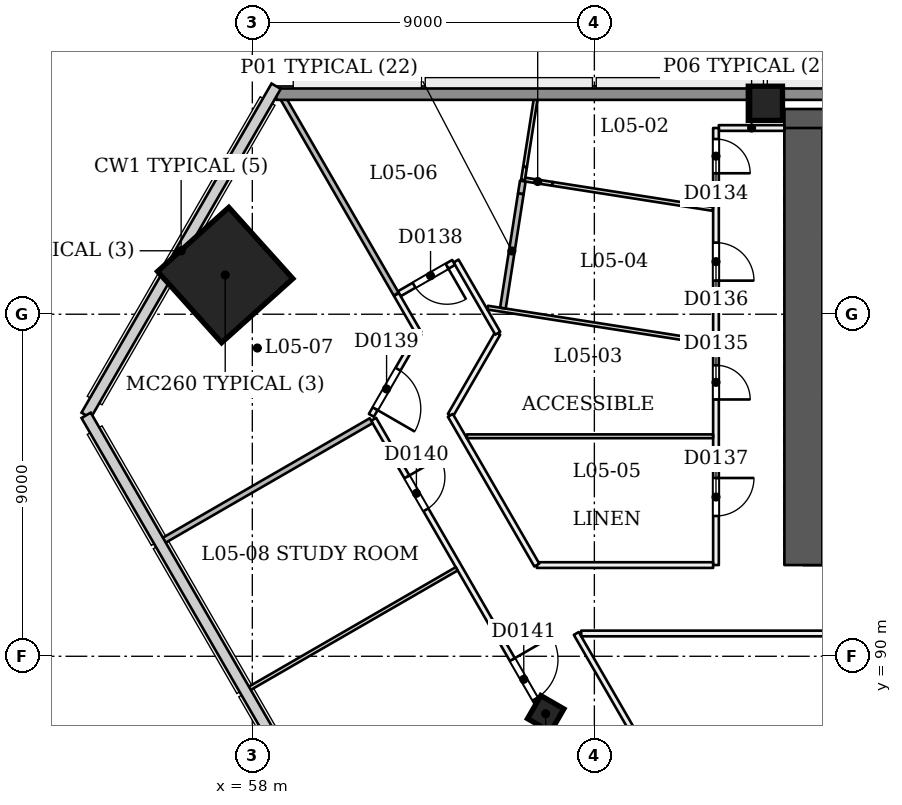
"""IFC4 building model, lengths in metres.
Left out: names, types, materials, properties, quantities, classifications, styles, units other than length and angle.
Written with IfcOpenShell. Run it as: python <this file> out.ifc"""

import sys

from ifc_helpers import new_model, si_unit, direction, frame, frame_2d, origin, origin_2d, place, context, subcontext, project, spatial, rectangle, extrude, element, fill, save


model = new_model("IFC4")
c1 = context("Model", 3, precision=1e-05, world=origin(), true_north=direction((0.0, 1.0)))
c2 = subcontext(c1, "Body", "Model", "MODEL_VIEW")
j1 = project(units=[si_unit("LENGTHUNIT", "METRE"), si_unit("PLANEANGLEUNIT", "RADIAN")], contexts=[c1])
p1 = place(None, origin())
s1 = spatial("IfcSite", under=j1, at=p1, CompositionType="ELEMENT")
p2 = place(p1, origin())
s2 = spatial("IfcBuilding", under=s1, at=p2, CompositionType="ELEMENT")
p3 = place(p2, frame((0.0, 0.0, 27.0)))
s3 = spatial("IfcBuildingStorey", under=s2, at=p3, CompositionType="ELEMENT", Elevation=27.0)
p4 = place(p3, frame((72.5, 92.9, 0.0), z_axis=(0.0, 0.0, 1.0), x_axis=(1.0, 0.0, 0.0)))
e1 = element("IfcWall", 1, at=p4, inside=s3, PredefinedType="SHEAR", context=c2, shape_type="SweptSolid", body=[
    extrude(rectangle(XDim=25.5, YDim=1.0, at=frame_2d((12.75, 0.0))), origin(), (0.0, 0.0, 1.0), 3.6),
])
p5 = place(p4, frame((1.3, 0.0, 0.0)))
e2 = element("IfcOpeningElement", 2, at=p5, cuts=e1, PredefinedType="OPENING", context=c2, shape_type="SweptSolid", body=[
    extrude(rectangle(XDim=1.2, YDim=2.1, at=frame_2d((0.6, 1.05))), frame((0.0, 0.51, 0.0), z_axis=(0.0, -1.0, 0.0), x_axis=(1.0, 0.0, 0.0)), (0.0, 0.0, 1.0), 1.021),
])
p6 = place(p4, frame((3.5, 0.0, 0.0)))
e3 = element("IfcOpeningElement", 3, at=p6, cuts=e1, PredefinedType="OPENING", context=c2, shape_type="SweptSolid", body=[
    extrude(rectangle(XDim=1.2, YDim=2.1, at=frame_2d((0.6, 1.05))), frame((0.0, 0.51, 0.0), z_axis=(0.0, -1.0, 0.0), x_axis=(1.0, 0.0, 0.0)), (0.0, 0.0, 1.0), 1.021),
])
p7 = place(p4, frame((13.5, 0.0, 0.0)))
e4 = element("IfcOpeningElement", 4, at=p7, cuts=e1, PredefinedType="OPENING", context=c2, shape_type="SweptSolid", body=[
    extrude(rectangle(XDim=1.2, YDim=2.1, at=frame_2d((0.6, 1.05))), frame((0.0, 0.51, 0.0), z_axis=(0.0, -1.0, 0.0), x_axis=(1.0, 0.0, 0.0)), (0.0, 0.0, 1.0), 1.021),
])
p8 = place(p4, frame((15.562, 0.0, 0.0)))
e5 = element("IfcOpeningElement", 5, at=p8, cuts=e1, PredefinedType="OPENING", context=c2, shape_type="SweptSolid", body=[
    extrude(rectangle(XDim=1.0, YDim=2.1, at=frame_2d((0.5, 1.05))), frame((0.0, 0.51, 0.0), z_axis=(0.0, -1.0, 0.0), x_axis=(1.0, 0.0, 0.0)), (0.0, 0.0, 1.0), 1.021),
])
p9 = place(p4, frame((17.8, 0.0, 0.0)))
e6 = element("IfcOpeningElement", 6, at=p9, cuts=e1, PredefinedType="OPENING", context=c2, shape_type="SweptSolid", body=[
    extrude(rectangle(XDim=1.0, YDim=2.1, at=frame_2d((0.5, 1.05))), frame((0.0, 0.51, 0.0), z_axis=(0.0, -1.0, 0.0), x_axis=(1.0, 0.0, 0.0)), (0.0, 0.0, 1.0), 1.021),
])
p10 = place(p4, frame((20.35, 0.0, 0.0)))
e7 = element("IfcOpeningElement", 7, at=p10, cuts=e1, PredefinedType="OPENING", context=c2, shape_type="SweptSolid", body=[
    extrude(rectangle(XDim=1.0, YDim=2.1, at=frame_2d((0.5, 1.05))), frame((0.0, 0.51, 0.0), z_axis=(0.0, -1.0, 0.0), x_axis=(1.0, 0.0, 0.0)), (0.0, 0.0, 1.0), 1.021),
])
p11 = place(p4, frame((22.837, 0.0, 0.0)))
e8 = element("IfcOpeningElement", 8, at=p11, cuts=e1, PredefinedType="OPENING", context=c2, shape_type="SweptSolid", body=[
    extrude(rectangle(XDim=1.0, YDim=2.1, at=frame_2d((0.5, 1.05))), frame((0.0, 0.51, 0.0), z_axis=(0.0, -1.0, 0.0), x_axis=(1.0, 0.0, 0.0)), (0.0, 0.0, 1.0), 1.021),
])
p12 = place(p3, frame((97.5, 103.9, 0.0), z_axis=(0.0, 0.0, 1.0), x_axis=(-1.0, 0.0, 0.0)))
e9 = element("IfcWall", 9, at=p12, inside=s3, PredefinedType="SHEAR", context=c2, shape_type="SweptSolid", body=[
    extrude(rectangle(XDim=25.5, YDim=1.0, at=frame_2d((12.75, 0.0))), origin(), (0.0, 0.0, 1.0), 3.6),
])
p13 = place(p3, frame((72.5, 103.9, 0.0), z_axis=(0.0, 0.0, 1.0), x_axis=(0.0, -1.0, 0.0)))
e10 = element("IfcWall", 10, at=p13, inside=s3, PredefinedType="SHEAR", context=c2, shape_type="SweptSolid", body=[
    extrude(rectangle(XDim=11.5, YDim=1.0, at=frame_2d((5.75, 0.0))), origin(), (0.0, 0.0, 1.0), 3.6),
])
p14 = place(p3, frame((65.692, 88.44, -0.021), z_axis=(0.02222134892, 0.038480872521, 0.999012229206), x_axis=(-0.865642072591, -0.499182214127, 0.038482713782)))
e11 = element("IfcColumn", 11, at=p14, inside=s3, PredefinedType="COLUMN", context=c2, shape_type="SweptSolid", body=[
    extrude(rectangle(XDim=0.7, YDim=0.7, at=origin_2d()), origin(), (0.0, 0.0, 1.0), 3.604),
])
p15 = place(p3, frame((57.253, 100.02, 0.0), z_axis=(0.028401796786, 0.009286506348, 0.999553449666), x_axis=(-0.866201915964, 0.499294786535, 0.019973905943)))
e12 = element("IfcColumn", 12, at=p15, inside=s3, PredefinedType="COLUMN", context=c2, shape_type="SweptSolid", body=[
    extrude(rectangle(XDim=2.52, YDim=2.52, at=origin_2d()), origin(), (0.0, 0.0, 1.0), 3.602),
])
p16 = place(p3, frame((71.5, 104.55, 0.0), z_axis=(0.0, 0.0, 1.0), x_axis=(1.0, 0.0, 0.0)))
e13 = element("IfcColumn", 13, at=p16, inside=s3, PredefinedType="COLUMN", context=c2, shape_type="SweptSolid", body=[
    extrude(rectangle(XDim=0.9, YDim=0.9, at=origin_2d()), origin(), (0.0, 0.0, 1.0), 3.6),
])
p17 = place(p3, frame((72.0, 103.9, 0.0), z_axis=(0.0, 0.0, 1.0), x_axis=(-1.0, 0.0, 0.0)))
e14 = element("IfcWall", 14, at=p17, inside=s3, PredefinedType="PARTITIONING", context=c2, shape_type="SweptSolid", body=[
    extrude(rectangle(XDim=1.725, YDim=0.15, at=frame_2d((0.863, 0.0))), origin(), (0.0, 0.0, 1.0), 2.6),
])
p18 = place(p3, frame((63.211, 96.34, 0.0), z_axis=(0.0, 0.0, 1.0), x_axis=(0.50004439687, 0.865999769722, 0.0)))
e15 = element("IfcWall", 15, at=p18, inside=s3, PredefinedType="PARTITIONING", context=c2, shape_type="SweptSolid", body=[
    extrude(rectangle(XDim=2.494, YDim=0.15, at=frame_2d((1.247, 0.0))), origin(), (0.0, 0.0, 1.0), 3.1),
])
p19 = place(p3, frame((70.2, 103.9, 0.0), z_axis=(0.0, 0.0, 1.0), x_axis=(0.0, -1.0, 0.0)))
e16 = element("IfcWall", 16, at=p19, inside=s3, PredefinedType="PARTITIONING", context=c2, shape_type="SweptSolid", body=[
    extrude(rectangle(XDim=11.5, YDim=0.15, at=frame_2d((5.75, 0.0))), origin(), (0.0, 0.0, 1.0), 2.6),
])
p20 = place(p19, frame((0.291, 0.0, 0.0)))
e17 = element("IfcOpeningElement", 17, at=p20, cuts=e16, PredefinedType="OPENING", context=c2, shape_type="SweptSolid", body=[
    extrude(rectangle(XDim=0.9, YDim=2.1, at=frame_2d((0.45, 1.05))), frame((0.0, 0.085, 0.0), z_axis=(0.0, -1.0, 0.0), x_axis=(1.0, 0.0, 0.0)), (0.0, 0.0, 1.0), 0.171),
])
p21 = place(p19, frame((6.243, 0.0, 0.0)))
e18 = element("IfcOpeningElement", 18, at=p21, cuts=e16, PredefinedType="OPENING", context=c2, shape_type="SweptSolid", body=[
    extrude(rectangle(XDim=0.9, YDim=2.1, at=frame_2d((0.45, 1.05))), frame((0.0, 0.085, 0.0), z_axis=(0.0, -1.0, 0.0), x_axis=(1.0, 0.0, 0.0)), (0.0, 0.0, 1.0), 0.171),
])
p22 = place(p19, frame((3.016, 0.0, 0.0)))
e19 = element("IfcOpeningElement", 19, at=p22, cuts=e16, PredefinedType="OPENING", context=c2, shape_type="SweptSolid", body=[
    extrude(rectangle(XDim=1.0, YDim=2.1, at=frame_2d((0.5, 1.05))), frame((0.0, 0.085, 0.0), z_axis=(0.0, -1.0, 0.0), x_axis=(1.0, 0.0, 0.0)), (0.0, 0.0, 1.0), 0.171),
])
p23 = place(p19, frame((9.209, 0.0, 0.0)))
e20 = element("IfcOpeningElement", 20, at=p23, cuts=e16, PredefinedType="OPENING", context=c2, shape_type="SweptSolid", body=[
    extrude(rectangle(XDim=1.0, YDim=2.1, at=frame_2d((0.5, 1.05))), frame((0.0, 0.085, 0.0), z_axis=(0.0, -1.0, 0.0), x_axis=(1.0, 0.0, 0.0)), (0.0, 0.0, 1.0), 0.171),
])
p24 = place(p3, frame((70.125, 92.4, 0.0), z_axis=(0.0, 0.0, 1.0), x_axis=(-1.0, 0.0, 0.0)))
e21 = element("IfcWall", 21, at=p24, inside=s3, PredefinedType="PARTITIONING", context=c2, shape_type="SweptSolid", body=[
    extrude(rectangle(XDim=4.639, YDim=0.15, at=frame_2d((2.32, 0.0))), origin(), (0.0, 0.0, 1.0), 3.1),
])
p25 = place(p3, frame((65.486, 92.4, 0.0), z_axis=(0.0, 0.0, 1.0), x_axis=(-0.499988785058, 0.866031878637, 0.0)))
e22 = element("IfcWall", 22, at=p25, inside=s3, PredefinedType="PARTITIONING", context=c2, shape_type="SweptSolid", body=[
    extrude(rectangle(XDim=4.549, YDim=0.15, at=frame_2d((2.275, 0.0))), origin(), (0.0, 0.0, 1.0), 3.1),
])
p26 = place(p3, frame((64.458, 98.5, 0.0), z_axis=(0.0, 0.0, 1.0), x_axis=(-0.500005024956, 0.866022502605, 0.0)))
e23 = element("IfcWall", 23, at=p26, inside=s3, PredefinedType="PARTITIONING", context=c2, shape_type="SweptSolid", body=[
    extrude(rectangle(XDim=2.194, YDim=0.15, at=frame_2d((1.097, 0.0))), origin(), (0.0, 0.0, 1.0), 3.1),
])
p27 = place(p3, frame((63.296, 100.363, 0.0), z_axis=(0.0, 0.0, 1.0), x_axis=(-0.866298776321, -0.499526205664, 0.0)))
e24 = element("IfcWall", 24, at=p27, inside=s3, PredefinedType="PARTITIONING", context=c2, shape_type="SweptSolid", body=[
    extrude(rectangle(XDim=1.651, YDim=0.15, at=frame_2d((0.826, 0.0))), origin(), (0.0, 0.0, 1.0), 3.1),
])
p28 = place(p27, frame((0.2, 0.0, 0.0)))
e25 = element("IfcOpeningElement", 25, at=p28, cuts=e24, PredefinedType="OPENING", context=c2, shape_type="SweptSolid", body=[
    extrude(rectangle(XDim=1.0, YDim=2.1, at=frame_2d((0.5, 1.05))), frame((0.0, 0.085, 0.0), z_axis=(0.0, -1.0, 0.0), x_axis=(1.0, 0.0, 0.0)), (0.0, 0.0, 1.0), 0.171),
])
p29 = place(p3, frame((61.792, 99.517, 0.0), z_axis=(0.0, 0.0, 1.0), x_axis=(0.499872391225, -0.86609906621, 0.0)))
e26 = element("IfcWall", 26, at=p29, inside=s3, PredefinedType="PARTITIONING", context=c2, shape_type="SweptSolid", body=[
    extrude(rectangle(XDim=1.175, YDim=0.15, at=frame_2d((0.587, 0.0))), origin(), (0.0, 0.0, 1.0), 3.1),
])
p30 = place(p3, frame((62.38, 98.5, 0.0), z_axis=(0.0, 0.0, 1.0), x_axis=(-0.499970989427, -0.866042152399, 0.0)))
e27 = element("IfcWall", 27, at=p30, inside=s3, PredefinedType="PARTITIONING", context=c2, shape_type="SweptSolid", body=[
    extrude(rectangle(XDim=2.494, YDim=0.15, at=frame_2d((1.247, 0.0))), origin(), (0.0, 0.0, 1.0), 3.1),
])
p31 = place(p30, frame((1.094, 0.0, 0.0)))
e28 = element("IfcOpeningElement", 28, at=p31, cuts=e27, PredefinedType="OPENING", context=c2, shape_type="SweptSolid", body=[
    extrude(rectangle(XDim=1.2, YDim=2.1, at=frame_2d((0.6, 1.05))), frame((0.0, 0.085, 0.0), z_axis=(0.0, -1.0, 0.0), x_axis=(1.0, 0.0, 0.0)), (0.0, 0.0, 1.0), 0.171),
])
p32 = place(p3, frame((61.193, 96.236, 0.0), z_axis=(0.0, 0.0, 1.0), x_axis=(0.49999953585, -0.866025671762, 0.0)))
e29 = element("IfcWall", 29, at=p32, inside=s3, PredefinedType="PARTITIONING", context=c2, shape_type="SweptSolid", body=[
    extrude(rectangle(XDim=45.0, YDim=0.15, at=frame_2d((22.5, 0.0))), origin(), (0.0, 0.0, 1.0), 2.7),
])
p33 = place(p32, frame((1.75, 0.0, 0.0)))
e30 = element("IfcOpeningElement", 30, at=p33, cuts=e29, PredefinedType="OPENING", context=c2, shape_type="SweptSolid", body=[
    extrude(rectangle(XDim=1.0, YDim=2.1, at=frame_2d((0.5, 1.05))), frame((0.0, 0.085, 0.0), z_axis=(0.0, -1.0, 0.0), x_axis=(1.0, 0.0, 0.0)), (0.0, 0.0, 1.0), 0.171),
])
p34 = place(p32, frame((7.3, 0.0, 0.0)))
e31 = element("IfcOpeningElement", 31, at=p34, cuts=e29, PredefinedType="OPENING", context=c2, shape_type="SweptSolid", body=[
    extrude(rectangle(XDim=1.2, YDim=2.1, at=frame_2d((0.6, 1.05))), frame((0.0, 0.085, 0.0), z_axis=(0.0, -1.0, 0.0), x_axis=(1.0, 0.0, 0.0)), (0.0, 0.0, 1.0), 0.171),
])
p35 = place(p32, frame((14.071, 0.0, 0.0)))
e32 = element("IfcOpeningElement", 32, at=p35, cuts=e29, PredefinedType="OPENING", context=c2, shape_type="SweptSolid", body=[
    extrude(rectangle(XDim=1.1, YDim=2.1, at=frame_2d((0.55, 1.05))), frame((0.0, 0.085, 0.0), z_axis=(0.0, -1.0, 0.0), x_axis=(1.0, 0.0, 0.0)), (0.0, 0.0, 1.0), 0.171),
])
p36 = place(p32, frame((20.78, 0.0, 0.0)))
e33 = element("IfcOpeningElement", 33, at=p36, cuts=e29, PredefinedType="OPENING", context=c2, shape_type="SweptSolid", body=[
    extrude(rectangle(XDim=1.0, YDim=2.1, at=frame_2d((0.5, 1.05))), frame((0.0, 0.085, 0.0), z_axis=(0.0, -1.0, 0.0), x_axis=(1.0, 0.0, 0.0)), (0.0, 0.0, 1.0), 0.171),
])
p37 = place(p32, frame((23.105, 0.0, 0.0)))
e34 = element("IfcOpeningElement", 34, at=p37, cuts=e29, PredefinedType="OPENING", context=c2, shape_type="SweptSolid", body=[
    extrude(rectangle(XDim=1.0, YDim=2.1, at=frame_2d((0.5, 1.05))), frame((0.0, 0.085, 0.0), z_axis=(0.0, -1.0, 0.0), x_axis=(1.0, 0.0, 0.0)), (0.0, 0.0, 1.0), 0.171),
])
p38 = place(p32, frame((28.75, 0.0, 0.0)))
e35 = element("IfcOpeningElement", 35, at=p38, cuts=e29, PredefinedType="OPENING", context=c2, shape_type="SweptSolid", body=[
    extrude(rectangle(XDim=1.0, YDim=2.1, at=frame_2d((0.5, 1.05))), frame((0.0, 0.085, 0.0), z_axis=(0.0, -1.0, 0.0), x_axis=(1.0, 0.0, 0.0)), (0.0, 0.0, 1.0), 0.171),
])
p39 = place(p32, frame((34.3, 0.0, 0.0)))
e36 = element("IfcOpeningElement", 36, at=p39, cuts=e29, PredefinedType="OPENING", context=c2, shape_type="SweptSolid", body=[
    extrude(rectangle(XDim=1.2, YDim=2.1, at=frame_2d((0.6, 1.05))), frame((0.0, 0.085, 0.0), z_axis=(0.0, -1.0, 0.0), x_axis=(1.0, 0.0, 0.0)), (0.0, 0.0, 1.0), 0.171),
])
p40 = place(p32, frame((43.28, 0.0, 0.0)))
e37 = element("IfcOpeningElement", 37, at=p40, cuts=e29, PredefinedType="OPENING", context=c2, shape_type="SweptSolid", body=[
    extrude(rectangle(XDim=1.0, YDim=2.1, at=frame_2d((0.5, 1.05))), frame((0.0, 0.085, 0.0), z_axis=(0.0, -1.0, 0.0), x_axis=(1.0, 0.0, 0.0)), (0.0, 0.0, 1.0), 0.171),
])
p41 = place(p3, frame((84.792, 58.96, 0.0), z_axis=(0.0, 0.0, 1.0), x_axis=(-0.499995675587, 0.866027900471, 0.0)))
e38 = element("IfcWall", 38, at=p41, inside=s3, PredefinedType="PARTITIONING", context=c2, shape_type="SweptSolid", body=[
    extrude(rectangle(XDim=36.534, YDim=0.15, at=frame_2d((18.267, 0.0))), origin(), (0.0, 0.0, 1.0), 3.1),
])
p42 = place(p41, frame((4.466, 0.0, 0.0)))
e39 = element("IfcOpeningElement", 39, at=p42, cuts=e38, PredefinedType="OPENING", context=c2, shape_type="SweptSolid", body=[
    extrude(rectangle(XDim=1.2, YDim=2.1, at=frame_2d((0.6, 1.05))), frame((0.0, 0.085, 0.0), z_axis=(0.0, -1.0, 0.0), x_axis=(1.0, 0.0, 0.0)), (0.0, 0.0, 1.0), 0.171),
])
p43 = place(p41, frame((16.337, 0.0, 0.0)))
e40 = element("IfcOpeningElement", 40, at=p43, cuts=e38, PredefinedType="OPENING", context=c2, shape_type="SweptSolid", body=[
    extrude(rectangle(XDim=1.2, YDim=2.1, at=frame_2d((0.6, 1.05))), frame((0.0, 0.085, 0.0), z_axis=(0.0, -1.0, 0.0), x_axis=(1.0, 0.0, 0.0)), (0.0, 0.0, 1.0), 0.171),
])
p44 = place(p41, frame((30.124, 0.0, 0.0)))
e41 = element("IfcOpeningElement", 41, at=p44, cuts=e38, PredefinedType="OPENING", context=c2, shape_type="SweptSolid", body=[
    extrude(rectangle(XDim=1.2, YDim=2.1, at=frame_2d((0.6, 1.05))), frame((0.0, 0.085, 0.0), z_axis=(0.0, -1.0, 0.0), x_axis=(1.0, 0.0, 0.0)), (0.0, 0.0, 1.0), 0.171),
])
p45 = place(p41, frame((24.546, 0.0, 0.0)))
e42 = element("IfcOpeningElement", 42, at=p45, cuts=e38, PredefinedType="OPENING", context=c2, shape_type="SweptSolid", body=[
    extrude(rectangle(XDim=1.2, YDim=2.1, at=frame_2d((0.6, 1.05))), frame((0.0, 0.085, 0.0), z_axis=(0.0, -1.0, 0.0), x_axis=(1.0, 0.0, 0.0)), (0.0, 0.0, 1.0), 0.171),
])
p46 = place(p3, frame((66.655, 90.6, 0.0), z_axis=(0.0, 0.0, 1.0), x_axis=(0.999999997968, -6.3746036e-05, 0.0)))
e43 = element("IfcWall", 43, at=p46, inside=s3, PredefinedType="PARTITIONING", context=c2, shape_type="SweptSolid", body=[
    extrude(rectangle(XDim=15.32, YDim=0.15, at=frame_2d((7.66, 0.0))), origin(), (0.0, 0.0, 1.0), 3.1),
])
p47 = place(p3, frame((65.125, 102.552, 0.0), z_axis=(0.0, 0.0, 1.0), x_axis=(0.987935551698, -0.154865572969, 0.0)))
e44 = element("IfcWall", 44, at=p47, inside=s3, PredefinedType="PARTITIONING", context=c2, shape_type="SweptSolid", body=[
    extrude(rectangle(XDim=0.777, YDim=0.1, at=frame_2d((0.389, 0.0))), origin(), (0.0, 0.0, 1.0), 2.6),
])
p48 = place(p3, frame((65.893, 102.432, 0.0), z_axis=(0.0, 0.0, 1.0), x_axis=(0.987956178166, -0.154733933008, 0.0)))
e45 = element("IfcWall", 45, at=p48, inside=s3, PredefinedType="PARTITIONING", context=c2, shape_type="SweptSolid", body=[
    extrude(rectangle(XDim=4.276, YDim=0.1, at=frame_2d((2.138, 0.0))), origin(), (0.0, 0.0, 1.0), 3.1),
])
p49 = place(p3, frame((65.493, 104.9, 0.0), z_axis=(0.0, 0.0, 1.0), x_axis=(-0.154751183602, -0.987953476219, 0.0)))
e46 = element("IfcWall", 46, at=p49, inside=s3, PredefinedType="PARTITIONING", context=c2, shape_type="SweptSolid", body=[
    extrude(rectangle(XDim=2.049, YDim=0.1, at=frame_2d((1.025, 0.0))), origin(), (0.0, 0.0, 1.0), 3.1),
])
p50 = place(p3, frame((65.176, 102.875, 0.0), z_axis=(0.0, 0.0, 1.0), x_axis=(-0.154698630223, -0.98796170665, 0.0)))
e47 = element("IfcWall", 47, at=p50, inside=s3, PredefinedType="PARTITIONING", context=c2, shape_type="SweptSolid", body=[
    extrude(rectangle(XDim=0.347, YDim=0.1, at=frame_2d((0.174, 0.0))), origin(), (0.0, 0.0, 1.0), 2.6),
])
p51 = place(p3, frame((70.117, 98.245, 0.0), z_axis=(0.0, 0.0, 1.0), x_axis=(-0.987955306668, 0.154739497307, 0.0)))
e48 = element("IfcWall", 48, at=p51, inside=s3, PredefinedType="PARTITIONING", context=c2, shape_type="SweptSolid", body=[
    extrude(rectangle(XDim=5.997, YDim=0.1, at=frame_2d((2.999, 0.0))), origin(), (0.0, 0.0, 1.0), 3.1),
])
p52 = place(p3, frame((63.645, 95.789, 0.0), z_axis=(0.0, 0.0, 1.0), x_axis=(1.0, 0.0, 0.0)))
e49 = element("IfcWall", 49, at=p52, inside=s3, PredefinedType="PARTITIONING", context=c2, shape_type="SweptSolid", body=[
    extrude(rectangle(XDim=6.48, YDim=0.1, at=frame_2d((3.24, 0.0))), origin(), (0.0, 0.0, 1.0), 3.1),
])
p53 = place(p3, frame((65.117, 102.502, 0.0), z_axis=(0.0, 0.0, 1.0), x_axis=(-0.154553127564, -0.987984479008, 0.0)))
e50 = element("IfcWall", 50, at=p53, inside=s3, PredefinedType="PARTITIONING", context=c2, shape_type="SweptSolid", body=[
    extrude(rectangle(XDim=0.338, YDim=0.15, at=frame_2d((0.169, 0.0))), origin(), (0.0, 0.0, 1.0), 2.6),
])
p54 = place(p3, frame((65.065, 102.168, 0.0), z_axis=(0.0, 0.0, 1.0), x_axis=(-0.154702251665, -0.987961139585, 0.0)))
e51 = element("IfcWall", 51, at=p54, inside=s3, PredefinedType="PARTITIONING", context=c2, shape_type="SweptSolid", body=[
    extrude(rectangle(XDim=3.044, YDim=0.15, at=frame_2d((1.522, 0.0))), origin(), (0.0, 0.0, 1.0), 3.1),
])
p55 = place(p3, frame((58.685, 104.9, 0.0), z_axis=(0.0, 0.0, 1.0), x_axis=(0.500005339912, -0.866022320763, 0.0)))
e52 = element("IfcWall", 52, at=p55, inside=s3, PredefinedType="PARTITIONING", context=c2, shape_type="SweptSolid", body=[
    extrude(rectangle(XDim=6.201, YDim=0.15, at=frame_2d((3.1, 0.0))), origin(), (0.0, 0.0, 1.0), 2.6),
])
p56 = place(p3, frame((55.633, 93.025, 0.0), z_axis=(0.0, 0.0, 1.0), x_axis=(0.866025401434, 0.500000004071, 0.0)))
e53 = element("IfcWall", 53, at=p56, inside=s3, PredefinedType="PARTITIONING", context=c2, shape_type="SweptSolid", body=[
    extrude(rectangle(XDim=6.345, YDim=0.15, at=frame_2d((3.173, 0.0))), origin(), (0.0, 0.0, 1.0), 2.6),
])
p57 = place(p3, frame((57.883, 89.128, 0.0), z_axis=(0.0, 0.0, 1.0), x_axis=(0.866025401434, 0.500000004071, 0.0)))
e54 = element("IfcWall", 54, at=p57, inside=s3, PredefinedType="PARTITIONING", context=c2, shape_type="SweptSolid", body=[
    extrude(rectangle(XDim=6.345, YDim=0.1, at=frame_2d((3.173, 0.0))), origin(), (0.0, 0.0, 1.0), 2.6),
])
p58 = place(p3, frame((58.627, 104.79, 0.0), z_axis=(0.0, 0.0, 1.0), x_axis=(1.0, 0.0, 0.0)))
e55 = element("IfcWall", 55, at=p58, inside=s3, PredefinedType="SOLIDWALL", context=c2, shape_type="SweptSolid", body=[
    extrude(rectangle(XDim=52.746, YDim=0.3, at=frame_2d((26.373, 0.0))), origin(), (0.0, 0.0, 1.0), 2.6),
])
p59 = place(p20, origin())
e56 = element("IfcDoor", 56, at=p59, inside=s3, OperationType="SINGLE_SWING_RIGHT", PredefinedType="NOTDEFINED", context=c2, shape_type="SweptSolid", body=[
    extrude(rectangle(XDim=0.9, YDim=2.1, at=frame_2d((0.45, 1.05))), frame((0.0, 0.025, 0.0), z_axis=(0.0, -1.0, 0.0), x_axis=(1.0, 0.0, 0.0)), (0.0, 0.0, 1.0), 0.05),
])
fill(e17, e56)
p60 = place(p21, origin())
e57 = element("IfcDoor", 57, at=p60, inside=s3, OperationType="SINGLE_SWING_RIGHT", PredefinedType="NOTDEFINED", context=c2, shape_type="SweptSolid", body=[
    extrude(rectangle(XDim=0.9, YDim=2.1, at=frame_2d((0.45, 1.05))), frame((0.0, 0.025, 0.0), z_axis=(0.0, -1.0, 0.0), x_axis=(1.0, 0.0, 0.0)), (0.0, 0.0, 1.0), 0.05),
])
fill(e18, e57)
p61 = place(p22, origin())
e58 = element("IfcDoor", 58, at=p61, inside=s3, OperationType="SINGLE_SWING_RIGHT", PredefinedType="NOTDEFINED", context=c2, shape_type="SweptSolid", body=[
    extrude(rectangle(XDim=1.0, YDim=2.1, at=frame_2d((0.5, 1.05))), frame((0.0, 0.025, 0.0), z_axis=(0.0, -1.0, 0.0), x_axis=(1.0, 0.0, 0.0)), (0.0, 0.0, 1.0), 0.05),
])
fill(e19, e58)
p62 = place(p23, origin())
e59 = element("IfcDoor", 59, at=p62, inside=s3, OperationType="SINGLE_SWING_LEFT", PredefinedType="NOTDEFINED", context=c2, shape_type="SweptSolid", body=[
    extrude(rectangle(XDim=1.0, YDim=2.1, at=frame_2d((0.5, 1.05))), frame((0.0, 0.025, 0.0), z_axis=(0.0, -1.0, 0.0), x_axis=(1.0, 0.0, 0.0)), (0.0, 0.0, 1.0), 0.05),
])
fill(e20, e59)
p63 = place(p28, origin())
e60 = element("IfcDoor", 60, at=p63, inside=s3, OperationType="SINGLE_SWING_LEFT", PredefinedType="NOTDEFINED", context=c2, shape_type="SweptSolid", body=[
    extrude(rectangle(XDim=1.0, YDim=2.1, at=frame_2d((0.5, 1.05))), frame((0.0, 0.025, 0.0), z_axis=(0.0, -1.0, 0.0), x_axis=(1.0, 0.0, 0.0)), (0.0, 0.0, 1.0), 0.05),
])
fill(e25, e60)
p64 = place(p31, origin())
e61 = element("IfcDoor", 61, at=p64, inside=s3, OperationType="SINGLE_SWING_RIGHT", PredefinedType="NOTDEFINED", context=c2, shape_type="SweptSolid", body=[
    extrude(rectangle(XDim=1.2, YDim=2.1, at=frame_2d((0.6, 1.05))), frame((0.0, 0.025, 0.0), z_axis=(0.0, -1.0, 0.0), x_axis=(1.0, 0.0, 0.0)), (0.0, 0.0, 1.0), 0.05),
])
fill(e28, e61)
p65 = place(p33, origin())
e62 = element("IfcDoor", 62, at=p65, inside=s3, OperationType="SINGLE_SWING_LEFT", PredefinedType="NOTDEFINED", context=c2, shape_type="SweptSolid", body=[
    extrude(rectangle(XDim=1.0, YDim=2.1, at=frame_2d((0.5, 1.05))), frame((0.0, 0.025, 0.0), z_axis=(0.0, -1.0, 0.0), x_axis=(1.0, 0.0, 0.0)), (0.0, 0.0, 1.0), 0.05),
])
fill(e30, e62)
p66 = place(p34, origin())
e63 = element("IfcDoor", 63, at=p66, inside=s3, OperationType="SINGLE_SWING_LEFT", PredefinedType="NOTDEFINED", context=c2, shape_type="SweptSolid", body=[
    extrude(rectangle(XDim=1.2, YDim=2.1, at=frame_2d((0.6, 1.05))), frame((0.0, 0.025, 0.0), z_axis=(0.0, -1.0, 0.0), x_axis=(1.0, 0.0, 0.0)), (0.0, 0.0, 1.0), 0.05),
])
fill(e31, e63)
save(model, sys.argv[1])
